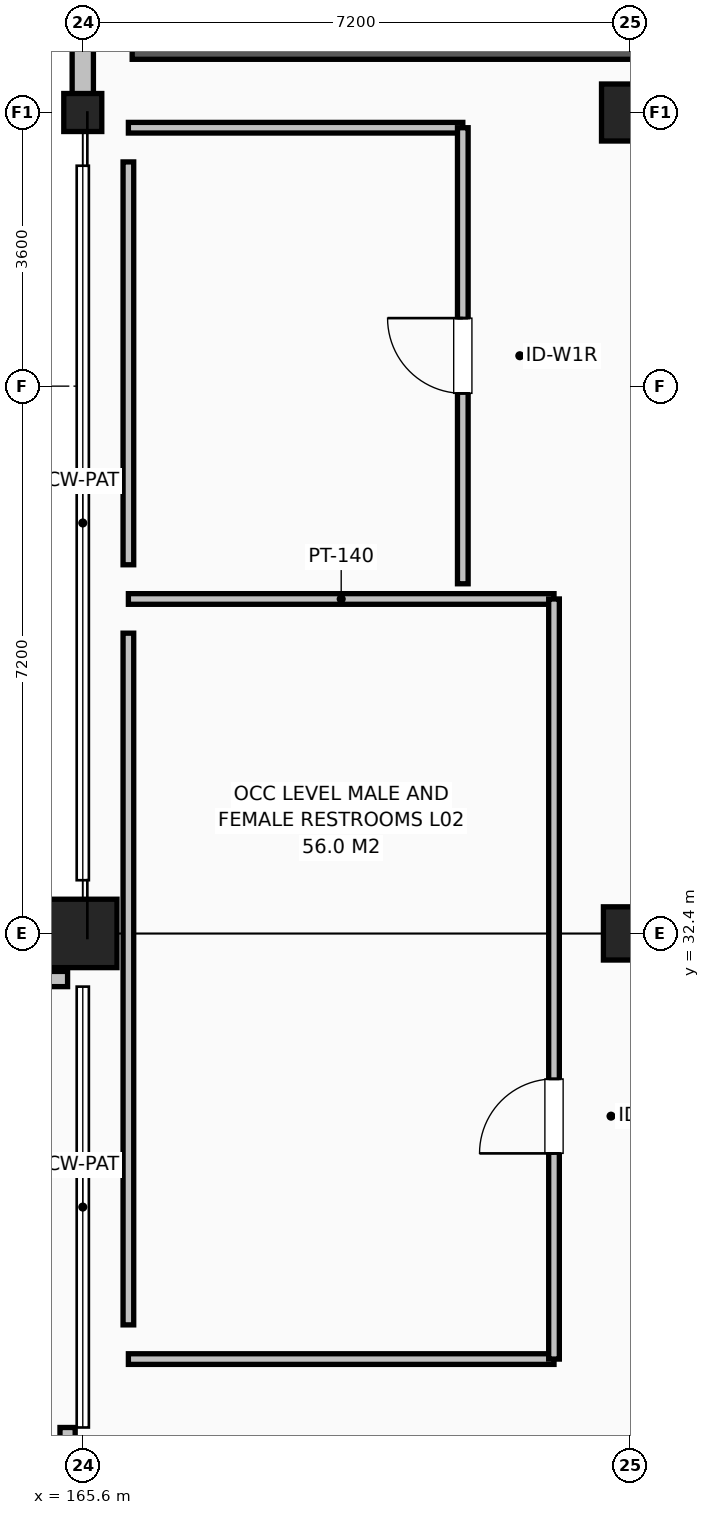
"""IFC4 building model, lengths in metres.
Left out: names, types, materials, properties, quantities, classifications, styles, units other than length and angle.
Written with IfcOpenShell. Run it as: python <this file> out.ifc"""

import sys

from ifc_helpers import new_model, si_unit, direction, frame, frame_2d, origin, origin_2d, place, context, subcontext, project, spatial, rectangle, circle, extrude, element, fill, save


model = new_model("IFC4")
c1 = context("Model", 3, precision=1e-05, world=origin(), true_north=direction((0.0, 1.0)))
c2 = subcontext(c1, "Body", "Model", "MODEL_VIEW")
j1 = project(units=[si_unit("LENGTHUNIT", "METRE"), si_unit("PLANEANGLEUNIT", "RADIAN")], contexts=[c1])
p1 = place(None, origin())
s1 = spatial("IfcSite", under=j1, at=p1, CompositionType="ELEMENT")
p2 = place(p1, origin())
s2 = spatial("IfcBuilding", under=s1, at=p2, CompositionType="ELEMENT")
p3 = place(p2, frame((0.0, 0.0, 9.0)))
s3 = spatial("IfcBuildingStorey", under=s2, at=p3, CompositionType="ELEMENT", Elevation=9.0)
p4 = place(p3, frame((165.6, 32.4, 0.0), z_axis=(0.0, 0.0, 1.0), x_axis=(1.0, 0.0, 0.0)))
e1 = element("IfcColumn", 1, at=p4, inside=s3, PredefinedType="COLUMN", context=c2, shape_type="SweptSolid", body=[
    extrude(rectangle(XDim=0.9, YDim=0.9, at=origin_2d()), origin(), (0.0, 0.0, 1.0), 4.2),
])
p5 = place(p3, frame((165.6, 43.2, 0.0), z_axis=(0.0, 0.0, 1.0), x_axis=(1.0, 0.0, 0.0)))
e2 = element("IfcColumn", 2, at=p5, inside=s3, PredefinedType="COLUMN", context=c2, shape_type="SweptSolid", body=[
    extrude(circle(Radius=0.25, at=origin_2d()), origin(), (0.0, 0.0, 1.0), 4.2),
])
p6 = place(p3, frame((172.8, 32.4, 0.0), z_axis=(0.0, 0.0, 1.0), x_axis=(1.0, 0.0, 0.0)))
e3 = element("IfcColumn", 3, at=p6, inside=s3, PredefinedType="COLUMN", context=c2, shape_type="SweptSolid", body=[
    extrude(rectangle(XDim=0.7, YDim=0.7, at=origin_2d()), origin(), (0.0, 0.0, 1.0), 4.2),
])
p7 = place(p3, frame((172.8, 43.2, 0.0), z_axis=(0.0, 0.0, 1.0), x_axis=(1.0, 0.0, 0.0)))
e4 = element("IfcColumn", 4, at=p7, inside=s3, PredefinedType="COLUMN", context=c2, shape_type="SweptSolid", body=[
    extrude(rectangle(XDim=0.75, YDim=0.75, at=origin_2d()), origin(), (0.0, 0.0, 1.0), 4.2),
])
p8 = place(p3, frame((165.6, 86.4, 0.0), z_axis=(0.0, 0.0, 1.0), x_axis=(0.0, -1.0, 0.0)))
e5 = element("IfcWall", 5, at=p8, inside=s3, PredefinedType="SOLIDWALL", context=c2, shape_type="SweptSolid", body=[
    extrude(rectangle(XDim=43.2, YDim=0.28, at=frame_2d((21.6, 0.0))), origin(), (0.0, 0.0, 1.0), 3.4),
])
p9 = place(p8, frame((9.4, 0.0, 0.78)))
e6 = element("IfcOpeningElement", 6, at=p9, cuts=e5, PredefinedType="OPENING", context=c2, shape_type="SweptSolid", body=[
    extrude(rectangle(XDim=2.1, YDim=1.8, at=frame_2d((1.05, 0.9))), frame((0.0, 0.15, 0.0), z_axis=(0.0, -1.0, 0.0), x_axis=(1.0, 0.0, 0.0)), (0.0, 0.0, 1.0), 0.3),
])
p10 = place(p8, frame((16.6, 0.0, 0.78)))
e7 = element("IfcOpeningElement", 7, at=p10, cuts=e5, PredefinedType="OPENING", context=c2, shape_type="SweptSolid", body=[
    extrude(rectangle(XDim=1.1, YDim=1.65, at=frame_2d((0.55, 0.825))), frame((0.0, 0.15, 0.0), z_axis=(0.0, -1.0, 0.0), x_axis=(1.0, 0.0, 0.0)), (0.0, 0.0, 1.0), 0.3),
])
p11 = place(p8, frame((23.8, 0.0, 0.78)))
e8 = element("IfcOpeningElement", 8, at=p11, cuts=e5, PredefinedType="OPENING", context=c2, shape_type="SweptSolid", body=[
    extrude(rectangle(XDim=1.25, YDim=1.7, at=frame_2d((0.625, 0.85))), frame((0.0, 0.15, 0.0), z_axis=(0.0, -1.0, 0.0), x_axis=(1.0, 0.0, 0.0)), (0.0, 0.0, 1.0), 0.3),
])
p12 = place(p3, frame((165.6, 32.4, 0.0), z_axis=(0.0, 0.0, 1.0), x_axis=(-1.0, 0.0, 0.0)))
e9 = element("IfcWall", 9, at=p12, inside=s3, PredefinedType="SOLIDWALL", context=c2, shape_type="SweptSolid", body=[
    extrude(rectangle(XDim=43.2, YDim=0.28, at=frame_2d((21.6, 0.0))), origin(), (0.0, 0.0, 1.0), 3.4),
])
p13 = place(p12, frame((2.2, 0.0, 0.78)))
e10 = element("IfcOpeningElement", 10, at=p13, cuts=e9, PredefinedType="OPENING", context=c2, shape_type="SweptSolid", body=[
    extrude(rectangle(XDim=2.1, YDim=1.8, at=frame_2d((1.05, 0.9))), frame((0.0, 0.15, 0.0), z_axis=(0.0, -1.0, 0.0), x_axis=(1.0, 0.0, 0.0)), (0.0, 0.0, 1.0), 0.3),
])
p14 = place(p12, frame((9.4, 0.0, 0.78)))
e11 = element("IfcOpeningElement", 11, at=p14, cuts=e9, PredefinedType="OPENING", context=c2, shape_type="SweptSolid", body=[
    extrude(rectangle(XDim=1.1, YDim=1.65, at=frame_2d((0.55, 0.825))), frame((0.0, 0.15, 0.0), z_axis=(0.0, -1.0, 0.0), x_axis=(1.0, 0.0, 0.0)), (0.0, 0.0, 1.0), 0.3),
])
p15 = place(p12, frame((16.6, 0.0, 0.78)))
e12 = element("IfcOpeningElement", 12, at=p15, cuts=e9, PredefinedType="OPENING", context=c2, shape_type="SweptSolid", body=[
    extrude(rectangle(XDim=1.25, YDim=1.7, at=frame_2d((0.625, 0.85))), frame((0.0, 0.15, 0.0), z_axis=(0.0, -1.0, 0.0), x_axis=(1.0, 0.0, 0.0)), (0.0, 0.0, 1.0), 0.3),
])
p16 = place(p12, frame((23.8, 0.0, 0.78)))
e13 = element("IfcOpeningElement", 13, at=p16, cuts=e9, PredefinedType="OPENING", context=c2, shape_type="SweptSolid", body=[
    extrude(rectangle(XDim=1.35, YDim=1.75, at=frame_2d((0.675, 0.875))), frame((0.0, 0.15, 0.0), z_axis=(0.0, -1.0, 0.0), x_axis=(1.0, 0.0, 0.0)), (0.0, 0.0, 1.0), 0.3),
])
p17 = place(p12, frame((31.0, 0.0, 0.78)))
e14 = element("IfcOpeningElement", 14, at=p17, cuts=e9, PredefinedType="OPENING", context=c2, shape_type="SweptSolid", body=[
    extrude(rectangle(XDim=1.5, YDim=1.75, at=frame_2d((0.75, 0.875))), frame((0.0, 0.15, 0.0), z_axis=(0.0, -1.0, 0.0), x_axis=(1.0, 0.0, 0.0)), (0.0, 0.0, 1.0), 0.3),
])
p18 = place(p3, frame((166.25, 44.05, 0.0), z_axis=(0.0, 0.0, 1.0), x_axis=(1.0, 0.0, 0.0)))
e15 = element("IfcWall", 15, at=p18, inside=s3, PredefinedType="SHEAR", context=c2, shape_type="SweptSolid", body=[
    extrude(rectangle(XDim=7.1, YDim=0.3, at=frame_2d((3.55, 0.0))), origin(), (0.0, 0.0, 1.0), 3.925),
])
p19 = place(p3, frame((151.6, 31.8, 0.0), z_axis=(0.0, 0.0, 1.0), x_axis=(1.0, 0.0, 0.0)))
e16 = element("IfcWall", 16, at=p19, inside=s3, PredefinedType="SOLIDWALL", context=c2, shape_type="SweptSolid", body=[
    extrude(rectangle(XDim=13.8, YDim=0.2, at=frame_2d((6.9, 0.0))), origin(), (0.0, 0.0, 1.0), 3.007),
])
p20 = place(p3, frame((165.4, 18.4, 0.0), z_axis=(0.0, 0.0, 1.0), x_axis=(0.0, 1.0, 0.0)))
e17 = element("IfcWall", 17, at=p20, inside=s3, PredefinedType="SOLIDWALL", context=c2, shape_type="SweptSolid", body=[
    extrude(rectangle(XDim=7.5, YDim=0.2, at=frame_2d((3.75, 0.0))), origin(), (0.0, 0.0, 1.0), 3.502),
])
for number, where, z_axis, x_axis in (
    (18, (166.2, 36.8, 0.0), (0.0, 0.0, 1.0), (1.0, 0.0, 0.0)),
    (19, (171.8, 26.8, 0.0), (0.0, 0.0, 1.0), (-1.0, 0.0, 0.0)),
):
    element("IfcWall", number, at=place(p3, frame(where, z_axis=z_axis, x_axis=x_axis)), inside=s3, PredefinedType="PARTITIONING", context=c2, shape_type="SweptSolid", body=[
        extrude(rectangle(XDim=5.6, YDim=0.14, at=frame_2d((2.8, 0.0))), origin(), (0.0, 0.0, 1.0), 3.5),
    ])
p21 = place(p3, frame((166.2, 36.35, 0.0), z_axis=(0.0, 0.0, 1.0), x_axis=(0.0, -1.0, 0.0)))
e20 = element("IfcWall", 20, at=p21, inside=s3, PredefinedType="PARTITIONING", context=c2, shape_type="SweptSolid", body=[
    extrude(rectangle(XDim=9.1, YDim=0.14, at=frame_2d((4.55, 0.0))), origin(), (0.0, 0.0, 1.0), 3.5),
])
p22 = place(p3, frame((171.8, 26.8, 0.0), z_axis=(0.0, 0.0, 1.0), x_axis=(0.0, 1.0, 0.0)))
e21 = element("IfcWall", 21, at=p22, inside=s3, PredefinedType="PARTITIONING", context=c2, shape_type="SweptSolid", body=[
    extrude(rectangle(XDim=10.0, YDim=0.14, at=frame_2d((5.0, 0.0))), origin(), (0.0, 0.0, 1.0), 3.5),
])
p23 = place(p22, frame((2.706, 0.0, 0.0)))
e22 = element("IfcOpeningElement", 22, at=p23, cuts=e21, PredefinedType="OPENING", context=c2, shape_type="SweptSolid", body=[
    extrude(rectangle(XDim=0.98, YDim=2.15, at=frame_2d((0.49, 1.075))), frame((0.0, 0.08, 0.0), z_axis=(0.0, -1.0, 0.0), x_axis=(1.0, 0.0, 0.0)), (0.0, 0.0, 1.0), 0.16),
])
p24 = place(p3, frame((166.2, 43.0, 0.0), z_axis=(0.0, 0.0, 1.0), x_axis=(1.0, 0.0, 0.0)))
e23 = element("IfcWall", 23, at=p24, inside=s3, PredefinedType="PARTITIONING", context=c2, shape_type="SweptSolid", body=[
    extrude(rectangle(XDim=4.4, YDim=0.14, at=frame_2d((2.2, 0.0))), origin(), (0.0, 0.0, 1.0), 3.057),
])
p25 = place(p3, frame((166.2, 42.55, 0.0), z_axis=(0.0, 0.0, 1.0), x_axis=(0.0, -1.0, 0.0)))
e24 = element("IfcWall", 24, at=p25, inside=s3, PredefinedType="PARTITIONING", context=c2, shape_type="SweptSolid", body=[
    extrude(rectangle(XDim=5.3, YDim=0.14, at=frame_2d((2.65, 0.0))), origin(), (0.0, 0.0, 1.0), 3.5),
])
p26 = place(p3, frame((170.6, 37.0, 0.0), z_axis=(0.0, 0.0, 1.0), x_axis=(0.0, 1.0, 0.0)))
e25 = element("IfcWall", 25, at=p26, inside=s3, PredefinedType="PARTITIONING", context=c2, shape_type="SweptSolid", body=[
    extrude(rectangle(XDim=6.0, YDim=0.14, at=frame_2d((3.0, 0.0))), origin(), (0.0, 0.0, 1.0), 3.057),
])
p27 = place(p26, frame((2.505, 0.0, 0.0)))
e26 = element("IfcOpeningElement", 26, at=p27, cuts=e25, PredefinedType="OPENING", context=c2, shape_type="SweptSolid", body=[
    extrude(rectangle(XDim=0.99, YDim=2.15, at=frame_2d((0.495, 1.075))), frame((0.0, 0.08, 0.0), z_axis=(0.0, -1.0, 0.0), x_axis=(1.0, 0.0, 0.0)), (0.0, 0.0, 1.0), 0.16),
])
p28 = place(p23, origin())
e27 = element("IfcDoor", 27, at=p28, inside=s3, OperationType="SINGLE_SWING_LEFT", PredefinedType="DOOR", context=c2, shape_type="SweptSolid", body=[
    extrude(rectangle(XDim=0.98, YDim=2.15, at=frame_2d((0.49, 1.075))), frame((0.0, 0.025, 0.0), z_axis=(0.0, -1.0, 0.0), x_axis=(1.0, 0.0, 0.0)), (0.0, 0.0, 1.0), 0.05),
])
fill(e22, e27)
p29 = place(p27, origin())
e28 = element("IfcDoor", 28, at=p29, inside=s3, OperationType="SINGLE_SWING_RIGHT", PredefinedType="DOOR", context=c2, shape_type="SweptSolid", body=[
    extrude(rectangle(XDim=0.99, YDim=2.15, at=frame_2d((0.495, 1.075))), frame((0.0, 0.025, 0.0), z_axis=(0.0, -1.0, 0.0), x_axis=(1.0, 0.0, 0.0)), (0.0, 0.0, 1.0), 0.05),
])
fill(e26, e28)
save(model, sys.argv[1])
